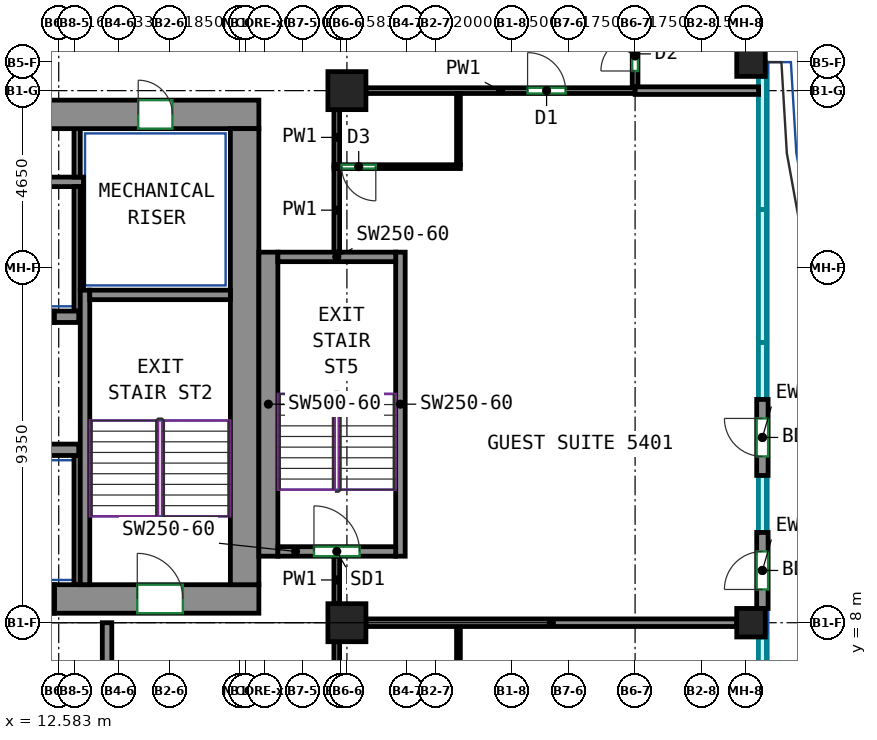
"""IFC4 building model, lengths in metres.
Left out: names, types, materials, properties, quantities, classifications, styles, units other than length and angle.
Written with IfcOpenShell. Run it as: python <this file> out.ifc"""

import sys

from ifc_helpers import new_model, si_unit, direction, frame, frame_2d, origin, origin_2d, place, context, subcontext, project, spatial, rectangle, extrude, source, transform, mapped, element, fill, save


model = new_model("IFC4")
c1 = context("Model", 3, precision=1e-05, world=origin(), true_north=direction((0.0, 1.0)))
c2 = subcontext(c1, "Body", "Model", "MODEL_VIEW")
j1 = project(units=[si_unit("LENGTHUNIT", "METRE"), si_unit("PLANEANGLEUNIT", "RADIAN")], contexts=[c1])
p1 = place(None, origin())
s1 = spatial("IfcSite", under=j1, at=p1, CompositionType="ELEMENT")
p2 = place(p1, origin())
s2 = spatial("IfcBuilding", under=s1, at=p2, CompositionType="ELEMENT")
p3 = place(p2, frame((0.0, 0.0, 220.3)))
s3 = spatial("IfcBuildingStorey", under=s2, at=p3, CompositionType="ELEMENT", Elevation=220.3)
m1 = source(origin(), c2, "Body", "SweptSolid", [
    extrude(rectangle(XDim=1.0, YDim=1.0, at=origin_2d()), origin(), (0.0, 0.0, 1.0), 3.0),
])
for number, where, z_axis, x_axis in (
    (1, (20.167, 8.0, 0.0), (0.0, 0.0, 1.0), (1.0, 0.0, 0.0)),
    (2, (20.167, 22.0, 0.0), (0.0, 0.0, 1.0), (1.0, 0.0, 0.0)),
):
    element("IfcColumn", number, at=place(p3, frame(where, z_axis=z_axis, x_axis=x_axis)), inside=s3, PredefinedType="COLUMN", context=c2, shape_type="MappedRepresentation", body=[
        mapped(m1, transform((0.0, 0.0, 0.0))),
    ])
m2 = source(origin(), c2, "Body", "SweptSolid", [
    extrude(rectangle(XDim=0.75, YDim=0.75, at=origin_2d()), origin(), (0.0, 0.0, 1.0), 3.0),
])
for number, where, z_axis, x_axis in (
    (3, (30.8, 8.0, 0.0), (0.0, 0.0, 1.0), (1.0, 0.0, 0.0)),
    (4, (30.8, 22.75, 0.0), (0.0, 0.0, 1.0), (1.0, 0.0, 0.0)),
):
    element("IfcColumn", number, at=place(p3, frame(where, z_axis=z_axis, x_axis=x_axis)), inside=s3, PredefinedType="COLUMN", context=c2, shape_type="MappedRepresentation", body=[
        mapped(m2, transform((0.0, 0.0, 0.0))),
    ])
m3 = source(origin(), c2, "Body", "SweptSolid", [
    extrude(rectangle(XDim=5.38, YDim=0.75, at=frame_2d((2.69, 0.0))), origin(), (0.0, 0.0, 1.0), 3.0),
])
p4 = place(p3, frame((12.47, 8.625, 0.0), z_axis=(0.0, 0.0, 1.0), x_axis=(1.0, 0.0, 0.0)))
e5 = element("IfcWall", 5, at=p4, inside=s3, PredefinedType="SHEAR", context=c2, shape_type="MappedRepresentation", body=[
    mapped(m3, transform((0.0, 0.0, 0.0))),
])
p5 = place(p4, frame((2.18, 0.0, 0.0)))
e6 = element("IfcOpeningElement", 6, at=p5, cuts=e5, PredefinedType="OPENING", context=c2, shape_type="SweptSolid", body=[
    extrude(rectangle(XDim=1.2, YDim=2.1, at=frame_2d((0.6, 1.05))), frame((0.0, 0.385, 0.0), z_axis=(0.0, -1.0, 0.0), x_axis=(1.0, 0.0, 0.0)), (0.0, 0.0, 1.0), 0.77),
])
m4 = source(origin(), c2, "Body", "SweptSolid", [
    extrude(rectangle(XDim=33.6, YDim=0.75, at=frame_2d((16.8, 0.0))), origin(), (0.0, 0.0, 1.0), 3.0),
])
p6 = place(p3, frame((-15.75, 21.375, 0.0), z_axis=(0.0, 0.0, 1.0), x_axis=(1.0, 0.0, 0.0)))
e7 = element("IfcWall", 7, at=p6, inside=s3, PredefinedType="SHEAR", context=c2, shape_type="MappedRepresentation", body=[
    mapped(m4, transform((0.0, 0.0, 0.0))),
])
p7 = place(p6, frame((8.27, 0.0, 0.0)))
e8 = element("IfcOpeningElement", 8, at=p7, cuts=e7, PredefinedType="OPENING", context=c2, shape_type="SweptSolid", body=[
    extrude(rectangle(XDim=0.9, YDim=2.1, at=frame_2d((0.45, 1.05))), frame((0.0, 0.385, 0.0), z_axis=(0.0, -1.0, 0.0), x_axis=(1.0, 0.0, 0.0)), (0.0, 0.0, 1.0), 0.77),
])
p8 = place(p6, frame((14.97, 0.0, 0.0)))
e9 = element("IfcOpeningElement", 9, at=p8, cuts=e7, PredefinedType="OPENING", context=c2, shape_type="SweptSolid", body=[
    extrude(rectangle(XDim=0.9, YDim=2.1, at=frame_2d((0.45, 1.05))), frame((0.0, 0.385, 0.0), z_axis=(0.0, -1.0, 0.0), x_axis=(1.0, 0.0, 0.0)), (0.0, 0.0, 1.0), 0.77),
])
p9 = place(p6, frame((19.794, 0.0, 0.0)))
e10 = element("IfcOpeningElement", 10, at=p9, cuts=e7, PredefinedType="OPENING", context=c2, shape_type="SweptSolid", body=[
    extrude(rectangle(XDim=0.9, YDim=2.1, at=frame_2d((0.45, 1.05))), frame((0.0, 0.385, 0.0), z_axis=(0.0, -1.0, 0.0), x_axis=(1.0, 0.0, 0.0)), (0.0, 0.0, 1.0), 0.77),
])
p10 = place(p6, frame((25.154, 0.0, 0.0)))
e11 = element("IfcOpeningElement", 11, at=p10, cuts=e7, PredefinedType="OPENING", context=c2, shape_type="SweptSolid", body=[
    extrude(rectangle(XDim=0.9, YDim=2.1, at=frame_2d((0.45, 1.05))), frame((0.0, 0.385, 0.0), z_axis=(0.0, -1.0, 0.0), x_axis=(1.0, 0.0, 0.0)), (0.0, 0.0, 1.0), 0.77),
])
p11 = place(p6, frame((2.275, 0.0, 0.0)))
e12 = element("IfcOpeningElement", 12, at=p11, cuts=e7, PredefinedType="OPENING", context=c2, shape_type="SweptSolid", body=[
    extrude(rectangle(XDim=0.9, YDim=2.1, at=frame_2d((0.45, 1.05))), frame((0.0, 0.385, 0.0), z_axis=(0.0, -1.0, 0.0), x_axis=(1.0, 0.0, 0.0)), (0.0, 0.0, 1.0), 0.77),
])
p12 = place(p6, frame((30.425, 0.0, 0.0)))
e13 = element("IfcOpeningElement", 13, at=p12, cuts=e7, PredefinedType="OPENING", context=c2, shape_type="SweptSolid", body=[
    extrude(rectangle(XDim=0.9, YDim=2.1, at=frame_2d((0.45, 1.05))), frame((0.0, 0.385, 0.0), z_axis=(0.0, -1.0, 0.0), x_axis=(1.0, 0.0, 0.0)), (0.0, 0.0, 1.0), 0.77),
])
m5 = source(origin(), c2, "Body", "SweptSolid", [
    extrude(rectangle(XDim=12.0, YDim=0.75, at=frame_2d((6.0, 0.0))), origin(), (0.0, 0.0, 1.0), 3.0),
])
p13 = place(p3, frame((17.475, 9.0, 0.0), z_axis=(0.0, 0.0, 1.0), x_axis=(0.0, 1.0, 0.0)))
e14 = element("IfcWall", 14, at=p13, inside=s3, PredefinedType="SHEAR", context=c2, shape_type="MappedRepresentation", body=[
    mapped(m5, transform((0.0, 0.0, 0.0))),
])
m6 = source(origin(), c2, "Body", "SweptSolid", [
    extrude(rectangle(XDim=7.75, YDim=0.25, at=frame_2d((3.875, 0.0))), origin(), (0.0, 0.0, 1.0), 3.0),
])
p14 = place(p3, frame((13.275, 9.0, 0.0), z_axis=(0.0, 0.0, 1.0), x_axis=(0.0, 1.0, 0.0)))
e15 = element("IfcWall", 15, at=p14, inside=s3, PredefinedType="SHEAR", context=c2, shape_type="MappedRepresentation", body=[
    mapped(m6, transform((0.0, 0.0, 0.0))),
])
m7 = source(origin(), c2, "Body", "SweptSolid", [
    extrude(rectangle(XDim=3.7, YDim=0.25, at=frame_2d((1.85, 0.0))), origin(), (0.0, 0.0, 1.0), 3.0),
])
p15 = place(p3, frame((13.4, 16.625, 0.0), z_axis=(0.0, 0.0, 1.0), x_axis=(1.0, 0.0, 0.0)))
e16 = element("IfcWall", 16, at=p15, inside=s3, PredefinedType="SHEAR", context=c2, shape_type="MappedRepresentation", body=[
    mapped(m7, transform((0.0, 0.0, 0.0))),
])
m8 = source(origin(), c2, "Body", "SweptSolid", [
    extrude(rectangle(XDim=8.0, YDim=0.5, at=frame_2d((4.0, 0.0))), origin(), (0.0, 0.0, 1.0), 3.0),
])
p16 = place(p3, frame((18.1, 9.75, 0.0), z_axis=(0.0, 0.0, 1.0), x_axis=(0.0, 1.0, 0.0)))
e17 = element("IfcWall", 17, at=p16, inside=s3, PredefinedType="SHEAR", context=c2, shape_type="MappedRepresentation", body=[
    mapped(m8, transform((0.0, 0.0, 0.0))),
])
m9 = source(origin(), c2, "Body", "SweptSolid", [
    extrude(rectangle(XDim=8.0, YDim=0.25, at=frame_2d((4.0, 0.0))), origin(), (0.0, 0.0, 1.0), 3.0),
])
p17 = place(p3, frame((21.575, 9.75, 0.0), z_axis=(0.0, 0.0, 1.0), x_axis=(0.0, 1.0, 0.0)))
e18 = element("IfcWall", 18, at=p17, inside=s3, PredefinedType="SHEAR", context=c2, shape_type="MappedRepresentation", body=[
    mapped(m9, transform((0.0, 0.0, 0.0))),
])
m10 = source(origin(), c2, "Body", "SweptSolid", [
    extrude(rectangle(XDim=3.1, YDim=0.25, at=frame_2d((1.55, 0.0))), origin(), (0.0, 0.0, 1.0), 3.0),
])
p18 = place(p3, frame((18.35, 9.875, 0.0), z_axis=(0.0, 0.0, 1.0), x_axis=(1.0, 0.0, 0.0)))
e19 = element("IfcWall", 19, at=p18, inside=s3, PredefinedType="SHEAR", context=c2, shape_type="MappedRepresentation", body=[
    mapped(m10, transform((0.0, 0.0, 0.0))),
])
p19 = place(p18, frame((0.95, 0.0, 0.0)))
e20 = element("IfcOpeningElement", 20, at=p19, cuts=e19, PredefinedType="OPENING", context=c2, shape_type="SweptSolid", body=[
    extrude(rectangle(XDim=1.2, YDim=2.1, at=frame_2d((0.6, 1.05))), frame((0.0, 0.135, 0.0), z_axis=(0.0, -1.0, 0.0), x_axis=(1.0, 0.0, 0.0)), (0.0, 0.0, 1.0), 0.27),
])
p20 = place(p3, frame((18.35, 17.625, 0.0), z_axis=(0.0, 0.0, 1.0), x_axis=(1.0, 0.0, 0.0)))
e21 = element("IfcWall", 21, at=p20, inside=s3, PredefinedType="SHEAR", context=c2, shape_type="MappedRepresentation", body=[
    mapped(m10, transform((0.0, 0.0, 0.0))),
])
m11 = source(origin(), c2, "Body", "SweptSolid", [
    extrude(rectangle(XDim=2.82, YDim=0.3, at=frame_2d((1.41, 0.0))), origin(), (0.0, 0.0, 1.0), 3.0),
])
p21 = place(p3, frame((10.29, 12.55, 0.0), z_axis=(0.0, 0.0, 1.0), x_axis=(1.0, 0.0, 0.0)))
e22 = element("IfcWall", 22, at=p21, inside=s3, PredefinedType="SHEAR", context=c2, shape_type="MappedRepresentation", body=[
    mapped(m11, transform((0.0, 0.0, 0.0))),
])
m12 = source(origin(), c2, "Body", "SweptSolid", [
    extrude(rectangle(XDim=0.64, YDim=0.3, at=frame_2d((0.32, 0.0))), origin(), (0.0, 0.0, 1.0), 3.0),
])
p22 = place(p3, frame((12.47, 16.05, 0.0), z_axis=(0.0, 0.0, 1.0), x_axis=(1.0, 0.0, 0.0)))
e23 = element("IfcWall", 23, at=p22, inside=s3, PredefinedType="SHEAR", context=c2, shape_type="MappedRepresentation", body=[
    mapped(m12, transform((0.0, 0.0, 0.0))),
])
m13 = source(origin(), c2, "Body", "SweptSolid", [
    extrude(rectangle(XDim=2.0, YDim=0.3, at=frame_2d((1.0, 0.0))), origin(), (0.0, 0.0, 1.0), 3.0),
])
p23 = place(p3, frame((31.1, 8.375, 0.0), z_axis=(0.0, 0.0, 1.0), x_axis=(0.0, 1.0, 0.0)))
e24 = element("IfcWall", 24, at=p23, inside=s3, PredefinedType="SOLIDWALL", context=c2, shape_type="MappedRepresentation", body=[
    mapped(m13, transform((0.0, 0.0, 0.0))),
])
p24 = place(p23, frame((0.5, 0.0, 0.0)))
e25 = element("IfcOpeningElement", 25, at=p24, cuts=e24, PredefinedType="OPENING", context=c2, shape_type="SweptSolid", body=[
    extrude(rectangle(XDim=1.0, YDim=2.1, at=frame_2d((0.5, 1.05))), frame((0.0, 0.16, 0.0), z_axis=(0.0, -1.0, 0.0), x_axis=(1.0, 0.0, 0.0)), (0.0, 0.0, 1.0), 0.32),
])
p25 = place(p3, frame((31.1, 11.875, 0.0), z_axis=(0.0, 0.0, 1.0), x_axis=(0.0, 1.0, 0.0)))
e26 = element("IfcWall", 26, at=p25, inside=s3, PredefinedType="SOLIDWALL", context=c2, shape_type="MappedRepresentation", body=[
    mapped(m13, transform((0.0, 0.0, 0.0))),
])
p26 = place(p25, frame((0.5, 0.0, 0.0)))
e27 = element("IfcOpeningElement", 27, at=p26, cuts=e26, PredefinedType="OPENING", context=c2, shape_type="SweptSolid", body=[
    extrude(rectangle(XDim=1.0, YDim=2.1, at=frame_2d((0.5, 1.05))), frame((0.0, 0.16, 0.0), z_axis=(0.0, -1.0, 0.0), x_axis=(1.0, 0.0, 0.0)), (0.0, 0.0, 1.0), 0.32),
])
m14 = source(origin(), c2, "Body", "SweptSolid", [
    extrude(rectangle(XDim=1.4, YDim=0.3, at=frame_2d((0.7, 0.0))), origin(), (0.0, 0.0, 1.0), 3.0),
])
p27 = place(p3, frame((11.07, 16.05, 0.0), z_axis=(0.0, 0.0, 1.0), x_axis=(1.0, 0.0, 0.0)))
e28 = element("IfcWall", 28, at=p27, inside=s3, PredefinedType="PARTITIONING", context=c2, shape_type="MappedRepresentation", body=[
    mapped(m14, transform((0.0, 0.0, 0.0))),
])
p28 = place(p27, frame((0.15, 0.0, 0.0)))
e29 = element("IfcOpeningElement", 29, at=p28, cuts=e28, PredefinedType="OPENING", context=c2, shape_type="SweptSolid", body=[
    extrude(rectangle(XDim=1.1, YDim=2.1, at=frame_2d((0.55, 1.05))), frame((0.0, 0.16, 0.0), z_axis=(0.0, -1.0, 0.0), x_axis=(1.0, 0.0, 0.0)), (0.0, 0.0, 1.0), 0.32),
])
m15 = source(origin(), c2, "Body", "SweptSolid", [
    extrude(rectangle(XDim=2.65, YDim=0.25, at=frame_2d((1.325, 0.0))), origin(), (0.0, 0.0, 1.0), 3.0),
])
p29 = place(p3, frame((13.855, 5.35, 0.0), z_axis=(0.0, 0.0, 1.0), x_axis=(0.0, 1.0, 0.0)))
e30 = element("IfcWall", 30, at=p29, inside=s3, PredefinedType="PARTITIONING", context=c2, shape_type="MappedRepresentation", body=[
    mapped(m15, transform((0.0, 0.0, 0.0))),
])
m16 = source(origin(), c2, "Body", "SweptSolid", [
    extrude(rectangle(XDim=10.97, YDim=0.25, at=frame_2d((5.485, 0.0))), origin(), (0.0, 0.0, 1.0), 3.0),
])
p30 = place(p3, frame((2.265, 19.6, 0.0), z_axis=(0.0, 0.0, 1.0), x_axis=(1.0, 0.0, 0.0)))
e31 = element("IfcWall", 31, at=p30, inside=s3, PredefinedType="PARTITIONING", context=c2, shape_type="MappedRepresentation", body=[
    mapped(m16, transform((0.0, 0.0, 0.0))),
])
m17 = source(origin(), c2, "Body", "SweptSolid", [
    extrude(rectangle(XDim=3.275, YDim=0.165, at=frame_2d((1.638, 0.0))), origin(), (0.0, 0.0, 1.0), 3.0),
])
p31 = place(p3, frame((13.067, 16.2, 0.0), z_axis=(0.0, 0.0, 1.0), x_axis=(0.0, 1.0, 0.0)))
e32 = element("IfcWall", 32, at=p31, inside=s3, PredefinedType="PARTITIONING", context=c2, shape_type="MappedRepresentation", body=[
    mapped(m17, transform((0.0, 0.0, 0.0))),
])
m18 = source(origin(), c2, "Body", "SweptSolid", [
    extrude(rectangle(XDim=1.275, YDim=0.165, at=frame_2d((0.637, 0.0))), origin(), (0.0, 0.0, 1.0), 3.0),
])
p32 = place(p3, frame((13.067, 19.725, 0.0), z_axis=(0.0, 0.0, 1.0), x_axis=(0.0, 1.0, 0.0)))
e33 = element("IfcWall", 33, at=p32, inside=s3, PredefinedType="PARTITIONING", context=c2, shape_type="MappedRepresentation", body=[
    mapped(m18, transform((0.0, 0.0, 0.0))),
])
m19 = source(origin(), c2, "Body", "SweptSolid", [
    extrude(rectangle(XDim=2.725, YDim=0.085, at=frame_2d((1.363, 0.0))), origin(), (0.0, 0.0, 1.0), 3.0),
])
p33 = place(p3, frame((13.192, 16.75, 0.0), z_axis=(0.0, 0.0, 1.0), x_axis=(0.0, 1.0, 0.0)))
e34 = element("IfcWall", 34, at=p33, inside=s3, PredefinedType="PARTITIONING", context=c2, shape_type="MappedRepresentation", body=[
    mapped(m19, transform((0.0, 0.0, 0.0))),
])
m20 = source(origin(), c2, "Body", "SweptSolid", [
    extrude(rectangle(XDim=3.4, YDim=0.165, at=frame_2d((1.7, 0.0))), origin(), (0.0, 0.0, 1.0), 3.0),
])
p34 = place(p3, frame((13.067, 9.0, 0.0), z_axis=(0.0, 0.0, 1.0), x_axis=(0.0, 1.0, 0.0)))
e35 = element("IfcWall", 35, at=p34, inside=s3, PredefinedType="PARTITIONING", context=c2, shape_type="MappedRepresentation", body=[
    mapped(m20, transform((0.0, 0.0, 0.0))),
])
m21 = source(origin(), c2, "Body", "SweptSolid", [
    extrude(rectangle(XDim=1.4, YDim=0.75, at=frame_2d((0.7, 0.0))), origin(), (0.0, 0.0, 1.0), 2.7),
])
p35 = place(p3, frame((11.07, 8.625, 0.0), z_axis=(0.0, 0.0, 1.0), x_axis=(1.0, 0.0, 0.0)))
e36 = element("IfcWall", 36, at=p35, inside=s3, PredefinedType="PARTITIONING", context=c2, shape_type="MappedRepresentation", body=[
    mapped(m21, transform((0.0, 0.0, 0.0))),
])
p36 = place(p35, frame((0.25, 0.0, 0.0)))
e37 = element("IfcOpeningElement", 37, at=p36, cuts=e36, PredefinedType="OPENING", context=c2, shape_type="SweptSolid", body=[
    extrude(rectangle(XDim=0.9, YDim=2.1, at=frame_2d((0.45, 1.05))), frame((0.0, 0.385, 0.0), z_axis=(0.0, -1.0, 0.0), x_axis=(1.0, 0.0, 0.0)), (0.0, 0.0, 1.0), 0.77),
])
p37 = place(p3, frame((19.9, 6.04, 0.0), z_axis=(0.0, 0.0, 1.0), x_axis=(0.0, 1.0, 0.0)))
e38 = element("IfcWall", 38, at=p37, inside=s3, PredefinedType="PARTITIONING", context=c2, shape_type="SweptSolid", body=[
    extrude(rectangle(XDim=1.46, YDim=0.15, at=frame_2d((0.73, 0.0))), origin(), (0.0, 0.0, 1.0), 2.4),
])
p38 = place(p3, frame((19.9, 17.75, 0.0), z_axis=(0.0, 0.0, 1.0), x_axis=(0.0, 1.0, 0.0)))
e39 = element("IfcWall", 39, at=p38, inside=s3, PredefinedType="PARTITIONING", context=c2, shape_type="SweptSolid", body=[
    extrude(rectangle(XDim=2.21, YDim=0.15, at=frame_2d((1.105, 0.0))), origin(), (0.0, 0.0, 1.0), 3.0),
])
p39 = place(p3, frame((19.9, 8.5, 0.0), z_axis=(0.0, 0.0, 1.0), x_axis=(0.0, 1.0, 0.0)))
e40 = element("IfcWall", 40, at=p39, inside=s3, PredefinedType="PARTITIONING", context=c2, shape_type="SweptSolid", body=[
    extrude(rectangle(XDim=1.25, YDim=0.15, at=frame_2d((0.625, 0.0))), origin(), (0.0, 0.0, 1.0), 3.0),
])
p40 = place(p3, frame((20.667, 22.0, 0.0), z_axis=(0.0, 0.0, 1.0), x_axis=(1.0, 0.0, 0.0)))
e41 = element("IfcWall", 41, at=p40, inside=s3, PredefinedType="PARTITIONING", context=c2, shape_type="SweptSolid", body=[
    extrude(rectangle(XDim=7.083, YDim=0.15, at=frame_2d((3.542, 0.0))), origin(), (0.0, 0.0, 1.0), 3.0),
])
p41 = place(p40, frame((4.254, 0.0, 0.0)))
e42 = element("IfcOpeningElement", 42, at=p41, cuts=e41, PredefinedType="OPENING", context=c2, shape_type="SweptSolid", body=[
    extrude(rectangle(XDim=1.0, YDim=2.1, at=frame_2d((0.5, 1.05))), frame((0.0, 0.085, 0.0), z_axis=(0.0, -1.0, 0.0), x_axis=(1.0, 0.0, 0.0)), (0.0, 0.0, 1.0), 0.17),
])
p42 = place(p3, frame((19.9, 20.04, 0.0), z_axis=(0.0, 0.0, 1.0), x_axis=(0.0, 1.0, 0.0)))
e43 = element("IfcWall", 43, at=p42, inside=s3, PredefinedType="PARTITIONING", context=c2, shape_type="SweptSolid", body=[
    extrude(rectangle(XDim=1.46, YDim=0.15, at=frame_2d((0.73, 0.0))), origin(), (0.0, 0.0, 1.0), 3.0),
])
p43 = place(p3, frame((27.75, 22.1, 0.0), z_axis=(0.0, 0.0, 1.0), x_axis=(0.0, 1.0, 0.0)))
e44 = element("IfcWall", 44, at=p43, inside=s3, PredefinedType="PARTITIONING", context=c2, shape_type="SweptSolid", body=[
    extrude(rectangle(XDim=1.625, YDim=0.15, at=frame_2d((0.812, 0.0))), origin(), (0.0, 0.0, 1.0), 2.4),
])
p44 = place(p43, frame((0.417, 0.0, 0.0)))
e45 = element("IfcOpeningElement", 45, at=p44, cuts=e44, PredefinedType="OPENING", context=c2, shape_type="SweptSolid", body=[
    extrude(rectangle(XDim=0.9, YDim=2.1, at=frame_2d((0.45, 1.05))), frame((0.0, 0.085, 0.0), z_axis=(0.0, -1.0, 0.0), x_axis=(1.0, 0.0, 0.0)), (0.0, 0.0, 1.0), 0.17),
])
p45 = place(p3, frame((23.102, 6.05, 0.0), z_axis=(0.0, 0.0, 1.0), x_axis=(0.0, 1.0, 0.0)))
e46 = element("IfcWall", 46, at=p45, inside=s3, PredefinedType="PARTITIONING", context=c2, shape_type="SweptSolid", body=[
    extrude(rectangle(XDim=1.85, YDim=0.1, at=frame_2d((0.925, 0.0))), origin(), (0.0, 0.0, 1.0), 3.0),
])
p46 = place(p3, frame((20.667, 8.0, 0.0), z_axis=(0.0, 0.0, 1.0), x_axis=(1.0, 0.0, 0.0)))
e47 = element("IfcWall", 47, at=p46, inside=s3, PredefinedType="PARTITIONING", context=c2, shape_type="SweptSolid", body=[
    extrude(rectangle(XDim=9.758, YDim=0.2, at=frame_2d((4.879, 0.0))), origin(), (0.0, 0.0, 1.0), 2.4),
])
p47 = place(p3, frame((23.102, 20.05, 0.0), z_axis=(0.0, 0.0, 1.0), x_axis=(0.0, 1.0, 0.0)))
e48 = element("IfcWall", 48, at=p47, inside=s3, PredefinedType="PARTITIONING", context=c2, shape_type="SweptSolid", body=[
    extrude(rectangle(XDim=1.873, YDim=0.1, at=frame_2d((0.937, 0.0))), origin(), (0.0, 0.0, 1.0), 3.0),
])
p48 = place(p3, frame((23.152, 20.0, 0.0), z_axis=(0.0, 0.0, 1.0), x_axis=(-1.0, 0.0, 0.0)))
e49 = element("IfcWall", 49, at=p48, inside=s3, PredefinedType="PARTITIONING", context=c2, shape_type="SweptSolid", body=[
    extrude(rectangle(XDim=3.325, YDim=0.1, at=frame_2d((1.663, 0.0))), origin(), (0.0, 0.0, 1.0), 3.0),
])
p49 = place(p48, frame((2.225, 0.0, 0.0)))
e50 = element("IfcOpeningElement", 50, at=p49, cuts=e49, PredefinedType="OPENING", context=c2, shape_type="SweptSolid", body=[
    extrude(rectangle(XDim=0.9, YDim=2.1, at=frame_2d((0.45, 1.05))), frame((0.0, 0.06, 0.0), z_axis=(0.0, -1.0, 0.0), x_axis=(1.0, 0.0, 0.0)), (0.0, 0.0, 1.0), 0.12),
])
p50 = place(p3, frame((27.752, 22.0, 0.0), z_axis=(0.0, 0.0, 1.0), x_axis=(1.0, 0.0, 0.0)))
e51 = element("IfcWall", 51, at=p50, inside=s3, PredefinedType="PARTITIONING", context=c2, shape_type="SweptSolid", body=[
    extrude(rectangle(XDim=3.248, YDim=0.2, at=frame_2d((1.624, 0.0))), origin(), (0.0, 0.0, 1.0), 3.0),
])
p51 = place(p24, origin())
e52 = element("IfcDoor", 52, at=p51, inside=s3, OperationType="SINGLE_SWING_LEFT", PredefinedType="DOOR", context=c2, shape_type="SweptSolid", body=[
    extrude(rectangle(XDim=1.0, YDim=2.1, at=frame_2d((0.5, 1.05))), frame((0.0, 0.025, 0.0), z_axis=(0.0, -1.0, 0.0), x_axis=(1.0, 0.0, 0.0)), (0.0, 0.0, 1.0), 0.05),
])
fill(e25, e52)
p52 = place(p26, origin())
e53 = element("IfcDoor", 53, at=p52, inside=s3, OperationType="SINGLE_SWING_RIGHT", PredefinedType="DOOR", context=c2, shape_type="SweptSolid", body=[
    extrude(rectangle(XDim=1.0, YDim=2.1, at=frame_2d((0.5, 1.05))), frame((0.0, 0.025, 0.0), z_axis=(0.0, -1.0, 0.0), x_axis=(1.0, 0.0, 0.0)), (0.0, 0.0, 1.0), 0.05),
])
fill(e27, e53)
p53 = place(p12, origin())
e54 = element("IfcDoor", 54, at=p53, inside=s3, OperationType="SINGLE_SWING_LEFT", PredefinedType="DOOR", context=c2, shape_type="SweptSolid", body=[
    extrude(rectangle(XDim=0.9, YDim=2.1, at=frame_2d((0.45, 1.05))), frame((0.0, -0.23, 0.0), z_axis=(0.0, -1.0, 0.0), x_axis=(1.0, 0.0, 0.0)), (0.0, 0.0, 1.0), 0.05),
])
fill(e13, e54)
p54 = place(p5, origin())
e55 = element("IfcDoor", 55, at=p54, inside=s3, OperationType="DOUBLE_DOOR_SINGLE_SWING", PredefinedType="DOOR", context=c2, shape_type="SweptSolid", body=[
    extrude(rectangle(XDim=1.2, YDim=2.1, at=frame_2d((0.6, 1.05))), frame((0.0, 0.28, 0.0), z_axis=(0.0, -1.0, 0.0), x_axis=(1.0, 0.0, 0.0)), (0.0, 0.0, 1.0), 0.05),
])
fill(e6, e55)
p55 = place(p19, origin())
e56 = element("IfcDoor", 56, at=p55, inside=s3, OperationType="DOUBLE_DOOR_SINGLE_SWING", PredefinedType="DOOR", context=c2, shape_type="SweptSolid", body=[
    extrude(rectangle(XDim=1.2, YDim=2.1, at=frame_2d((0.6, 1.05))), frame((0.0, 0.025, 0.0), z_axis=(0.0, -1.0, 0.0), x_axis=(1.0, 0.0, 0.0)), (0.0, 0.0, 1.0), 0.05),
])
fill(e20, e56)
p56 = place(p49, origin())
e57 = element("IfcDoor", 57, at=p56, inside=s3, OperationType="SINGLE_SWING_LEFT", PredefinedType="DOOR", context=c2, shape_type="SweptSolid", body=[
    extrude(rectangle(XDim=0.9, YDim=2.1, at=frame_2d((0.45, 1.05))), frame((0.0, 0.025, 0.0), z_axis=(0.0, -1.0, 0.0), x_axis=(1.0, 0.0, 0.0)), (0.0, 0.0, 1.0), 0.05),
])
fill(e50, e57)
p57 = place(p41, origin())
e58 = element("IfcDoor", 58, at=p57, inside=s3, OperationType="SINGLE_SWING_LEFT", PredefinedType="DOOR", context=c2, shape_type="SweptSolid", body=[
    extrude(rectangle(XDim=1.0, YDim=2.1, at=frame_2d((0.5, 1.05))), frame((0.0, 0.025, 0.0), z_axis=(0.0, -1.0, 0.0), x_axis=(1.0, 0.0, 0.0)), (0.0, 0.0, 1.0), 0.05),
])
fill(e42, e58)
p58 = place(p44, origin())
e59 = element("IfcDoor", 59, at=p58, inside=s3, OperationType="SINGLE_SWING_LEFT", PredefinedType="DOOR", context=c2, shape_type="SweptSolid", body=[
    extrude(rectangle(XDim=0.9, YDim=2.1, at=frame_2d((0.45, 1.05))), frame((0.0, 0.025, 0.0), z_axis=(0.0, -1.0, 0.0), x_axis=(1.0, 0.0, 0.0)), (0.0, 0.0, 1.0), 0.05),
])
fill(e45, e59)
save(model, sys.argv[1])
